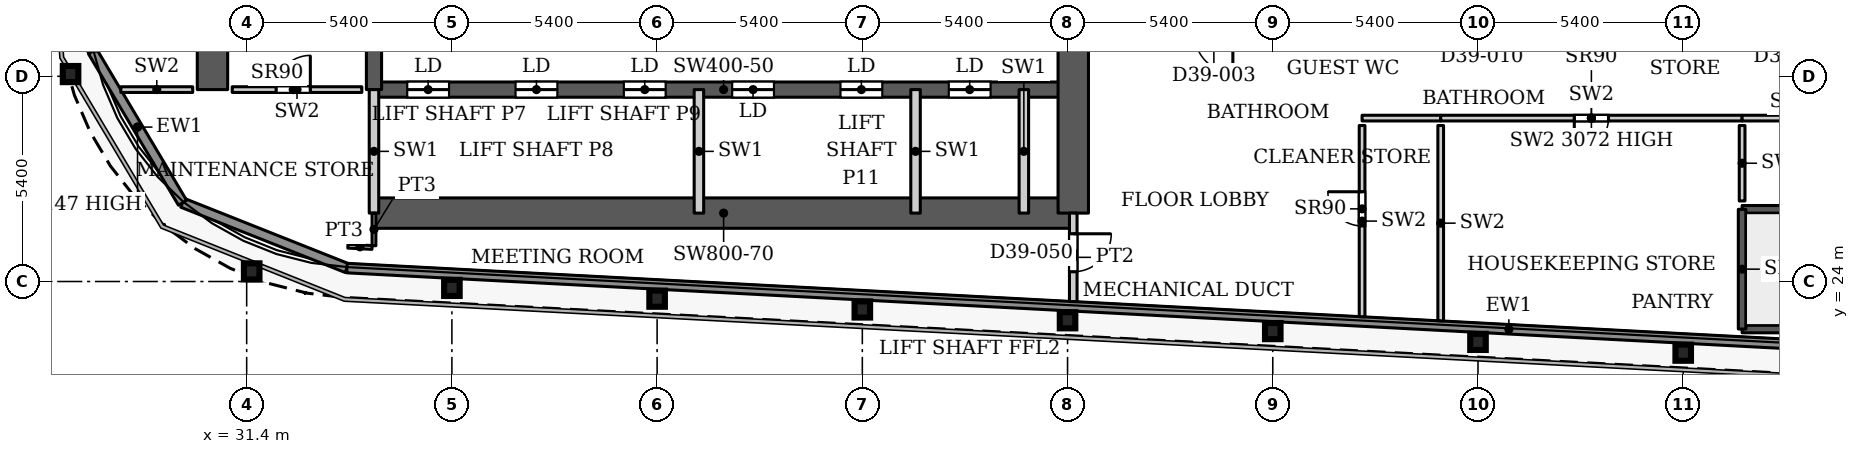
"""IFC4 building model, lengths in metres.
Left out: names, types, materials, properties, quantities, classifications, styles, units other than length and angle.
Written with IfcOpenShell. Run it as: python <this file> out.ifc"""

import sys

from ifc_helpers import new_model, si_unit, direction, frame, frame_2d, origin, origin_2d, place, context, subcontext, project, spatial, rectangle, i_section, extrude, source, transform, mapped, element, fill, save


model = new_model("IFC4")
c1 = context("Model", 3, precision=1e-05, world=origin(), true_north=direction((0.0, 1.0)))
c2 = subcontext(c1, "Body", "Model", "MODEL_VIEW")
j1 = project(units=[si_unit("LENGTHUNIT", "METRE"), si_unit("PLANEANGLEUNIT", "RADIAN")], contexts=[c1])
p1 = place(None, origin())
s1 = spatial("IfcSite", under=j1, at=p1, CompositionType="ELEMENT")
p2 = place(p1, origin())
s2 = spatial("IfcBuilding", under=s1, at=p2, CompositionType="ELEMENT")
p3 = place(p2, frame((0.0, 0.0, 172.1)))
s3 = spatial("IfcBuildingStorey", under=s2, at=p3, CompositionType="ELEMENT", Elevation=172.1)
for number, where, z_axis, x_axis in (
    (1, (69.2, 22.127, 0.0), (0.0, 0.0, 1.0), (1.0, 0.0, 0.0)),
    (2, (63.8, 22.411, 0.0), (0.0, 0.0, 1.0), (1.0, 0.0, 0.0)),
    (3, (58.4, 22.695, 0.0), (0.0, 0.0, 1.0), (1.0, 0.0, 0.0)),
    (4, (53.0, 22.98, 0.0), (0.0, 0.0, 1.0), (1.0, 0.0, 0.0)),
    (5, (47.6, 23.264, 0.0), (0.0, 0.0, 1.0), (1.0, 0.0, 0.0)),
    (6, (42.2, 23.548, 0.0), (0.0, 0.0, 1.0), (1.0, 0.0, 0.0)),
    (7, (36.8, 23.832, 0.0), (0.0, 0.0, 1.0), (1.0, 0.0, 0.0)),
    (8, (31.532, 24.266, 0.0), (0.0, 0.0, 1.0), (1.0, 0.0, 0.0)),
    (9, (26.766, 29.459, 0.0), (0.0, 0.0, 1.0), (1.0, 0.0, 0.0)),
):
    element("IfcColumn", number, at=place(p3, frame(where, z_axis=z_axis, x_axis=x_axis)), inside=s3, PredefinedType="COLUMN", context=c2, shape_type="SweptSolid", body=[
        extrude(i_section(OverallWidth=0.409, OverallDepth=0.425, WebThickness=0.033, FlangeThickness=0.052, FilletRadius=0.013, at=origin_2d()), origin(), (0.0, 0.0, 1.0), 3.9),
    ])
p4 = place(p3, frame((34.75, 25.8, 0.0), z_axis=(0.0, 0.0, 1.0), x_axis=(1.0, 0.0, 0.0)))
e10 = element("IfcWall", 10, at=p4, inside=s3, PredefinedType="SHEAR", context=c2, shape_type="SweptSolid", body=[
    extrude(rectangle(XDim=18.4, YDim=0.8, at=frame_2d((9.2, 0.0))), origin(), (0.0, 0.0, 1.0), 3.9),
])
p5 = place(p3, frame((34.75, 29.05, 0.0), z_axis=(0.0, 0.0, 1.0), x_axis=(1.0, 0.0, 0.0)))
e11 = element("IfcWall", 11, at=p5, inside=s3, PredefinedType="SHEAR", context=c2, shape_type="SweptSolid", body=[
    extrude(rectangle(XDim=18.4, YDim=0.4, at=frame_2d((9.2, 0.0))), origin(), (0.0, 0.0, 1.0), 3.9),
])
p6 = place(p5, frame((0.875, 0.0, 0.0)))
e12 = element("IfcOpeningElement", 12, at=p6, cuts=e11, PredefinedType="OPENING", context=c2, shape_type="SweptSolid", body=[
    extrude(rectangle(XDim=1.1, YDim=2.2, at=frame_2d((0.55, 1.1))), frame((0.0, 0.21, 0.0), z_axis=(0.0, -1.0, 0.0), x_axis=(1.0, 0.0, 0.0)), (0.0, 0.0, 1.0), 0.42),
])
p7 = place(p5, frame((3.725, 0.0, 0.0)))
e13 = element("IfcOpeningElement", 13, at=p7, cuts=e11, PredefinedType="OPENING", context=c2, shape_type="SweptSolid", body=[
    extrude(rectangle(XDim=1.1, YDim=2.2, at=frame_2d((0.55, 1.1))), frame((0.0, 0.21, 0.0), z_axis=(0.0, -1.0, 0.0), x_axis=(1.0, 0.0, 0.0)), (0.0, 0.0, 1.0), 0.42),
])
p8 = place(p5, frame((6.575, 0.0, 0.0)))
e14 = element("IfcOpeningElement", 14, at=p8, cuts=e11, PredefinedType="OPENING", context=c2, shape_type="SweptSolid", body=[
    extrude(rectangle(XDim=1.1, YDim=2.2, at=frame_2d((0.55, 1.1))), frame((0.0, 0.21, 0.0), z_axis=(0.0, -1.0, 0.0), x_axis=(1.0, 0.0, 0.0)), (0.0, 0.0, 1.0), 0.42),
])
p9 = place(p5, frame((9.425, 0.0, 0.0)))
e15 = element("IfcOpeningElement", 15, at=p9, cuts=e11, PredefinedType="OPENING", context=c2, shape_type="SweptSolid", body=[
    extrude(rectangle(XDim=1.1, YDim=2.2, at=frame_2d((0.55, 1.1))), frame((0.0, 0.21, 0.0), z_axis=(0.0, -1.0, 0.0), x_axis=(1.0, 0.0, 0.0)), (0.0, 0.0, 1.0), 0.42),
])
p10 = place(p5, frame((12.275, 0.0, 0.0)))
e16 = element("IfcOpeningElement", 16, at=p10, cuts=e11, PredefinedType="OPENING", context=c2, shape_type="SweptSolid", body=[
    extrude(rectangle(XDim=1.1, YDim=2.2, at=frame_2d((0.55, 1.1))), frame((0.0, 0.21, 0.0), z_axis=(0.0, -1.0, 0.0), x_axis=(1.0, 0.0, 0.0)), (0.0, 0.0, 1.0), 0.42),
])
p11 = place(p5, frame((15.125, 0.0, 0.0)))
e17 = element("IfcOpeningElement", 17, at=p11, cuts=e11, PredefinedType="OPENING", context=c2, shape_type="SweptSolid", body=[
    extrude(rectangle(XDim=1.1, YDim=2.2, at=frame_2d((0.55, 1.1))), frame((0.0, 0.21, 0.0), z_axis=(0.0, -1.0, 0.0), x_axis=(1.0, 0.0, 0.0)), (0.0, 0.0, 1.0), 0.42),
])
p12 = place(p3, frame((34.75, 29.05, 0.0), z_axis=(0.0, 0.0, 1.0), x_axis=(0.0, 1.0, 0.0)))
e18 = element("IfcWall", 18, at=p12, inside=s3, PredefinedType="SHEAR", context=c2, shape_type="SweptSolid", body=[
    extrude(rectangle(XDim=18.45, YDim=0.4, at=frame_2d((9.225, 0.0))), origin(), (0.0, 0.0, 1.0), 3.9),
])
p13 = place(p12, frame((8.025, 0.0, 0.0)))
e19 = element("IfcOpeningElement", 19, at=p13, cuts=e18, PredefinedType="OPENING", context=c2, shape_type="SweptSolid", body=[
    extrude(rectangle(XDim=1.1, YDim=2.2, at=frame_2d((0.55, 1.1))), frame((0.0, 0.21, 0.0), z_axis=(0.0, -1.0, 0.0), x_axis=(1.0, 0.0, 0.0)), (0.0, 0.0, 1.0), 0.42),
])
p14 = place(p12, frame((10.875, 0.0, 0.0)))
e20 = element("IfcOpeningElement", 20, at=p14, cuts=e18, PredefinedType="OPENING", context=c2, shape_type="SweptSolid", body=[
    extrude(rectangle(XDim=1.1, YDim=2.2, at=frame_2d((0.55, 1.1))), frame((0.0, 0.21, 0.0), z_axis=(0.0, -1.0, 0.0), x_axis=(1.0, 0.0, 0.0)), (0.0, 0.0, 1.0), 0.42),
])
p15 = place(p12, frame((13.725, 0.0, 0.0)))
e21 = element("IfcOpeningElement", 21, at=p15, cuts=e18, PredefinedType="OPENING", context=c2, shape_type="SweptSolid", body=[
    extrude(rectangle(XDim=1.1, YDim=2.2, at=frame_2d((0.55, 1.1))), frame((0.0, 0.21, 0.0), z_axis=(0.0, -1.0, 0.0), x_axis=(1.0, 0.0, 0.0)), (0.0, 0.0, 1.0), 0.42),
])
p16 = place(p12, frame((15.95, 0.0, 0.0)))
e22 = element("IfcOpeningElement", 22, at=p16, cuts=e18, PredefinedType="OPENING", context=c2, shape_type="SweptSolid", body=[
    extrude(rectangle(XDim=1.1, YDim=2.2, at=frame_2d((0.55, 1.1))), frame((0.0, 0.21, 0.0), z_axis=(0.0, -1.0, 0.0), x_axis=(1.0, 0.0, 0.0)), (0.0, 0.0, 1.0), 0.42),
])
p17 = place(p3, frame((30.5, 29.05, 0.0), z_axis=(0.0, 0.0, 1.0), x_axis=(0.0, 1.0, 0.0)))
e23 = element("IfcWall", 23, at=p17, inside=s3, PredefinedType="SHEAR", context=c2, shape_type="SweptSolid", body=[
    extrude(rectangle(XDim=18.45, YDim=0.8, at=frame_2d((9.225, 0.0))), origin(), (0.0, 0.0, 1.0), 3.9),
])
p18 = place(p17, frame((1.5, 0.0, 0.0)))
e24 = element("IfcOpeningElement", 24, at=p18, cuts=e23, PredefinedType="OPENING", context=c2, shape_type="SweptSolid", body=[
    extrude(rectangle(XDim=0.9, YDim=2.2, at=frame_2d((0.45, 1.1))), frame((0.0, 0.41, 0.0), z_axis=(0.0, -1.0, 0.0), x_axis=(1.0, 0.0, 0.0)), (0.0, 0.0, 1.0), 0.82),
])
p19 = place(p17, frame((7.406, 0.0, 0.0)))
e25 = element("IfcOpeningElement", 25, at=p19, cuts=e23, PredefinedType="OPENING", context=c2, shape_type="SweptSolid", body=[
    extrude(rectangle(XDim=0.9, YDim=2.2, at=frame_2d((0.45, 1.1))), frame((0.0, 0.41, 0.0), z_axis=(0.0, -1.0, 0.0), x_axis=(1.0, 0.0, 0.0)), (0.0, 0.0, 1.0), 0.82),
])
p20 = place(p17, frame((11.688, 0.0, 0.0)))
e26 = element("IfcOpeningElement", 26, at=p20, cuts=e23, PredefinedType="OPENING", context=c2, shape_type="SweptSolid", body=[
    extrude(rectangle(XDim=0.9, YDim=2.2, at=frame_2d((0.45, 1.1))), frame((0.0, 0.41, 0.0), z_axis=(0.0, -1.0, 0.0), x_axis=(1.0, 0.0, 0.0)), (0.0, 0.0, 1.0), 0.82),
])
p21 = place(p3, frame((53.15, 25.8, 0.0), z_axis=(0.0, 0.0, 1.0), x_axis=(0.0, 1.0, 0.0)))
e27 = element("IfcWall", 27, at=p21, inside=s3, PredefinedType="SHEAR", context=c2, shape_type="SweptSolid", body=[
    extrude(rectangle(XDim=10.4, YDim=0.8, at=frame_2d((5.2, 0.0))), origin(), (0.0, 0.0, 1.0), 3.9),
])
p22 = place(p3, frame((34.039, 24.353, 0.0), z_axis=(0.0, 0.0, 1.0), x_axis=(-0.929352825399, 0.369192803184, 0.0)))
e28 = element("IfcWall", 28, at=p22, inside=s3, PredefinedType="SOLIDWALL", context=c2, shape_type="SweptSolid", body=[
    extrude(rectangle(XDim=4.656, YDim=0.25, at=frame_2d((2.328, 0.0))), origin(), (0.0, 0.0, 1.0), 3.75),
])
p23 = place(p3, frame((29.712, 26.072, 0.0), z_axis=(0.0, 0.0, 1.0), x_axis=(-0.511028049012, 0.859564036662, 0.0)))
e29 = element("IfcWall", 29, at=p23, inside=s3, PredefinedType="SOLIDWALL", context=c2, shape_type="SweptSolid", body=[
    extrude(rectangle(XDim=4.634, YDim=0.25, at=frame_2d((2.317, 0.0))), origin(), (0.0, 0.0, 1.0), 3.147),
])
p24 = place(p3, frame((27.344, 30.055, 0.0), z_axis=(0.0, 0.0, 1.0), x_axis=(-0.077571675317, 0.99698677784, 0.0)))
e30 = element("IfcWall", 30, at=p24, inside=s3, PredefinedType="SOLIDWALL", context=c2, shape_type="SweptSolid", body=[
    extrude(rectangle(XDim=1.92, YDim=0.25, at=frame_2d((0.96, 0.0))), origin(), (0.0, 0.0, 1.0), 3.75),
])
p25 = place(p3, frame((95.186, 21.134, 0.0), z_axis=(0.0, 0.0, 1.0), x_axis=(-0.998617201448, 0.052570761569, 0.0)))
e31 = element("IfcWall", 31, at=p25, inside=s3, PredefinedType="SOLIDWALL", context=c2, shape_type="SweptSolid", body=[
    extrude(rectangle(XDim=61.232, YDim=0.25, at=frame_2d((30.616, 0.0))), origin(), (0.0, 0.0, 1.0), 3.75),
])
p26 = place(p3, frame((70.75, 22.75, 0.0), z_axis=(0.0, 0.0, 1.0), x_axis=(1.0, 0.0, 0.0)))
e32 = element("IfcWall", 32, at=p26, inside=s3, PredefinedType="SHEAR", context=c2, shape_type="SweptSolid", body=[
    extrude(rectangle(XDim=9.16, YDim=0.2, at=frame_2d((4.58, 0.0))), origin(), (0.0, 0.0, 1.0), 3.9),
])
p27 = place(p3, frame((70.75, 25.9, 0.0), z_axis=(0.0, 0.0, 1.0), x_axis=(1.0, 0.0, 0.0)))
e33 = element("IfcWall", 33, at=p27, inside=s3, PredefinedType="SHEAR", context=c2, shape_type="SweptSolid", body=[
    extrude(rectangle(XDim=9.16, YDim=0.2, at=frame_2d((4.58, 0.0))), origin(), (0.0, 0.0, 1.0), 3.9),
])
p28 = place(p27, frame((7.81, 0.0, 0.0)))
e34 = element("IfcOpeningElement", 34, at=p28, cuts=e33, PredefinedType="OPENING", context=c2, shape_type="SweptSolid", body=[
    extrude(rectangle(XDim=1.1, YDim=2.2, at=frame_2d((0.55, 1.1))), frame((0.0, 0.11, 0.0), z_axis=(0.0, -1.0, 0.0), x_axis=(1.0, 0.0, 0.0)), (0.0, 0.0, 1.0), 0.22),
])
p29 = place(p3, frame((70.75, 22.75, 0.0), z_axis=(0.0, 0.0, 1.0), x_axis=(0.0, 1.0, 0.0)))
e35 = element("IfcWall", 35, at=p29, inside=s3, PredefinedType="SHEAR", context=c2, shape_type="SweptSolid", body=[
    extrude(rectangle(XDim=3.15, YDim=0.2, at=frame_2d((1.575, 0.0))), origin(), (0.0, 0.0, 1.0), 3.9),
])
for number, where, z_axis, x_axis in (
    (36, (34.75, 25.8, 0.0), (0.0, 0.0, 1.0), (0.0, 1.0, 0.0)),
    (37, (43.3, 25.8, 0.0), (0.0, 0.0, 1.0), (0.0, 1.0, 0.0)),
    (38, (49.0, 25.8, 0.0), (0.0, 0.0, 1.0), (0.0, 1.0, 0.0)),
    (39, (51.85, 25.8, 0.0), (0.0, 0.0, 1.0), (0.0, 1.0, 0.0)),
):
    element("IfcWall", number, at=place(p3, frame(where, z_axis=z_axis, x_axis=x_axis)), inside=s3, PredefinedType="PARTITIONING", context=c2, shape_type="SweptSolid", body=[
        extrude(rectangle(XDim=3.25, YDim=0.25, at=frame_2d((1.625, 0.0))), origin(), (0.0, 0.0, 1.0), 3.9),
    ])
p30 = place(p3, frame((28.089, 29.05, 0.0), z_axis=(0.0, 0.0, 1.0), x_axis=(1.0, 0.0, 0.0)))
e40 = element("IfcWall", 40, at=p30, inside=s3, PredefinedType="PARTITIONING", context=c2, shape_type="SweptSolid", body=[
    extrude(rectangle(XDim=1.891, YDim=0.15, at=frame_2d((0.945, 0.0))), origin(), (0.0, 0.0, 1.0), 3.9),
])
p31 = place(p3, frame((31.02, 29.05, 0.0), z_axis=(0.0, 0.0, 1.0), x_axis=(1.0, 0.0, 0.0)))
e41 = element("IfcWall", 41, at=p31, inside=s3, PredefinedType="PARTITIONING", context=c2, shape_type="SweptSolid", body=[
    extrude(rectangle(XDim=3.41, YDim=0.15, at=frame_2d((1.705, 0.0))), origin(), (0.0, 0.0, 1.0), 3.9),
])
p32 = place(p31, frame((1.155, 0.0, 0.0)))
e42 = element("IfcOpeningElement", 42, at=p32, cuts=e41, PredefinedType="OPENING", context=c2, shape_type="SweptSolid", body=[
    extrude(rectangle(XDim=0.9, YDim=2.2, at=frame_2d((0.45, 1.1))), frame((0.0, 0.085, 0.0), z_axis=(0.0, -1.0, 0.0), x_axis=(1.0, 0.0, 0.0)), (0.0, 0.0, 1.0), 0.17),
])
p33 = place(p3, frame((60.75, 28.3, 0.0), z_axis=(0.0, 0.0, 1.0), x_axis=(1.0, 0.0, 0.0)))
e43 = element("IfcWall", 43, at=p33, inside=s3, PredefinedType="PARTITIONING", context=c2, shape_type="SweptSolid", body=[
    extrude(rectangle(XDim=2.069, YDim=0.15, at=frame_2d((1.035, 0.0))), origin(), (0.0, 0.0, 1.0), 3.9),
])
p34 = place(p3, frame((60.75, 23.075, 0.0), z_axis=(0.0, 0.0, 1.0), x_axis=(0.0, 1.0, 0.0)))
e44 = element("IfcWall", 44, at=p34, inside=s3, PredefinedType="PARTITIONING", context=c2, shape_type="SweptSolid", body=[
    extrude(rectangle(XDim=5.03, YDim=0.15, at=frame_2d((2.515, 0.0))), origin(), (0.0, 0.0, 1.0), 3.9),
])
p35 = place(p34, frame((2.387, 0.0, 0.0)))
e45 = element("IfcOpeningElement", 45, at=p35, cuts=e44, PredefinedType="OPENING", context=c2, shape_type="SweptSolid", body=[
    extrude(rectangle(XDim=0.9, YDim=2.2, at=frame_2d((0.45, 1.1))), frame((0.0, 0.085, 0.0), z_axis=(0.0, -1.0, 0.0), x_axis=(1.0, 0.0, 0.0)), (0.0, 0.0, 1.0), 0.17),
])
p36 = place(p3, frame((62.819, 22.966, 0.0), z_axis=(0.0, 0.0, 1.0), x_axis=(0.0, 1.0, 0.0)))
e46 = element("IfcWall", 46, at=p36, inside=s3, PredefinedType="PARTITIONING", context=c2, shape_type="SweptSolid", body=[
    extrude(rectangle(XDim=5.139, YDim=0.15, at=frame_2d((2.569, 0.0))), origin(), (0.0, 0.0, 1.0), 3.9),
])
p37 = place(p3, frame((62.819, 28.3, 0.0), z_axis=(0.0, 0.0, 1.0), x_axis=(1.0, 0.0, 0.0)))
e47 = element("IfcWall", 47, at=p37, inside=s3, PredefinedType="PARTITIONING", context=c2, shape_type="SweptSolid", body=[
    extrude(rectangle(XDim=7.931, YDim=0.15, at=frame_2d((3.965, 0.0))), origin(), (0.0, 0.0, 1.0), 3.072),
])
p38 = place(p37, frame((3.515, 0.0, 0.0)))
e48 = element("IfcOpeningElement", 48, at=p38, cuts=e47, PredefinedType="OPENING", context=c2, shape_type="SweptSolid", body=[
    extrude(rectangle(XDim=0.9, YDim=2.2, at=frame_2d((0.45, 1.1))), frame((0.0, 0.085, 0.0), z_axis=(0.0, -1.0, 0.0), x_axis=(1.0, 0.0, 0.0)), (0.0, 0.0, 1.0), 0.17),
])
p39 = place(p3, frame((70.75, 26.12, 0.0), z_axis=(0.0, 0.0, 1.0), x_axis=(0.0, 1.0, 0.0)))
e49 = element("IfcWall", 49, at=p39, inside=s3, PredefinedType="PARTITIONING", context=c2, shape_type="SweptSolid", body=[
    extrude(rectangle(XDim=1.985, YDim=0.15, at=frame_2d((0.992, 0.0))), origin(), (0.0, 0.0, 1.0), 3.9),
])
p40 = place(p3, frame((70.75, 28.3, 0.0), z_axis=(0.0, 0.0, 1.0), x_axis=(1.0, 0.0, 0.0)))
e50 = element("IfcWall", 50, at=p40, inside=s3, PredefinedType="PARTITIONING", context=c2, shape_type="SweptSolid", body=[
    extrude(rectangle(XDim=3.686, YDim=0.15, at=frame_2d((1.843, 0.0))), origin(), (0.0, 0.0, 1.0), 3.9),
])
p41 = place(p40, frame((1.393, 0.0, 0.0)))
e51 = element("IfcOpeningElement", 51, at=p41, cuts=e50, PredefinedType="OPENING", context=c2, shape_type="SweptSolid", body=[
    extrude(rectangle(XDim=0.9, YDim=2.2, at=frame_2d((0.45, 1.1))), frame((0.0, 0.085, 0.0), z_axis=(0.0, -1.0, 0.0), x_axis=(1.0, 0.0, 0.0)), (0.0, 0.0, 1.0), 0.17),
])
p42 = place(p3, frame((34.063, 24.929, 0.0), z_axis=(0.0, 0.0, 1.0), x_axis=(0.998663963404, -0.051674831376, 0.0)))
e52 = element("IfcWall", 52, at=p42, inside=s3, PredefinedType="PARTITIONING", context=c2, shape_type="SweptSolid", body=[
    extrude(rectangle(XDim=0.638, YDim=0.1, at=frame_2d((0.319, 0.0))), origin(), (0.0, 0.0, 1.0), 3.6),
])
p43 = place(p3, frame((34.75, 24.942, 0.0), z_axis=(0.0, 0.0, 1.0), x_axis=(0.0, 1.0, 0.0)))
e53 = element("IfcWall", 53, at=p43, inside=s3, PredefinedType="PARTITIONING", context=c2, shape_type="SweptSolid", body=[
    extrude(rectangle(XDim=0.858, YDim=0.1, at=frame_2d((0.429, 0.0))), origin(), (0.0, 0.0, 1.0), 3.6),
])
p44 = place(p3, frame((53.15, 23.472, 0.0), z_axis=(0.0, 0.0, 1.0), x_axis=(0.0, 1.0, 0.0)))
e54 = element("IfcWall", 54, at=p44, inside=s3, PredefinedType="PARTITIONING", context=c2, shape_type="SweptSolid", body=[
    extrude(rectangle(XDim=2.328, YDim=0.2, at=frame_2d((1.164, 0.0))), origin(), (0.0, 0.0, 1.0), 3.6),
])
p45 = place(p44, frame((0.784, 0.0, 0.0)))
e55 = element("IfcOpeningElement", 55, at=p45, cuts=e54, PredefinedType="OPENING", context=c2, shape_type="SweptSolid", body=[
    extrude(rectangle(XDim=1.0, YDim=2.1, at=frame_2d((0.5, 1.05))), frame((0.0, 0.11, 0.0), z_axis=(0.0, -1.0, 0.0), x_axis=(1.0, 0.0, 0.0)), (0.0, 0.0, 1.0), 0.22),
])
m1 = source(origin(), c2, "Body", "SweptSolid", [
    extrude(rectangle(XDim=1.1, YDim=2.2, at=frame_2d((0.55, 1.1))), frame((0.0, 0.025, 0.0), z_axis=(0.0, -1.0, 0.0), x_axis=(1.0, 0.0, 0.0)), (0.0, 0.0, 1.0), 0.05),
])
p46 = place(p6, origin())
e56 = element("IfcDoor", 56, at=p46, inside=s3, OperationType="SLIDING_TO_LEFT", PredefinedType="DOOR", context=c2, shape_type="MappedRepresentation", body=[
    mapped(m1, transform((0.0, 0.0, 0.0), x_axis=(1.0, 0.0, 0.0), y_axis=(0.0, 1.0, 0.0), z_axis=(0.0, 0.0, 1.0), scale=1.0)),
])
fill(e12, e56)
p47 = place(p7, origin())
e57 = element("IfcDoor", 57, at=p47, inside=s3, OperationType="SLIDING_TO_LEFT", PredefinedType="DOOR", context=c2, shape_type="MappedRepresentation", body=[
    mapped(m1, transform((0.0, 0.0, 0.0), x_axis=(1.0, 0.0, 0.0), y_axis=(0.0, 1.0, 0.0), z_axis=(0.0, 0.0, 1.0), scale=1.0)),
])
fill(e13, e57)
p48 = place(p8, origin())
e58 = element("IfcDoor", 58, at=p48, inside=s3, OperationType="SLIDING_TO_LEFT", PredefinedType="DOOR", context=c2, shape_type="MappedRepresentation", body=[
    mapped(m1, transform((0.0, 0.0, 0.0), x_axis=(1.0, 0.0, 0.0), y_axis=(0.0, 1.0, 0.0), z_axis=(0.0, 0.0, 1.0), scale=1.0)),
])
fill(e14, e58)
p49 = place(p9, origin())
e59 = element("IfcDoor", 59, at=p49, inside=s3, OperationType="SLIDING_TO_LEFT", PredefinedType="DOOR", context=c2, shape_type="MappedRepresentation", body=[
    mapped(m1, transform((0.0, 0.0, 0.0), x_axis=(1.0, 0.0, 0.0), y_axis=(0.0, 1.0, 0.0), z_axis=(0.0, 0.0, 1.0), scale=1.0)),
])
fill(e15, e59)
p50 = place(p10, origin())
e60 = element("IfcDoor", 60, at=p50, inside=s3, OperationType="SLIDING_TO_LEFT", PredefinedType="DOOR", context=c2, shape_type="MappedRepresentation", body=[
    mapped(m1, transform((0.0, 0.0, 0.0), x_axis=(1.0, 0.0, 0.0), y_axis=(0.0, 1.0, 0.0), z_axis=(0.0, 0.0, 1.0), scale=1.0)),
])
fill(e16, e60)
p51 = place(p11, origin())
e61 = element("IfcDoor", 61, at=p51, inside=s3, OperationType="SLIDING_TO_LEFT", PredefinedType="DOOR", context=c2, shape_type="MappedRepresentation", body=[
    mapped(m1, transform((0.0, 0.0, 0.0), x_axis=(1.0, 0.0, 0.0), y_axis=(0.0, 1.0, 0.0), z_axis=(0.0, 0.0, 1.0), scale=1.0)),
])
fill(e17, e61)
m2 = source(origin(), c2, "Body", "SweptSolid", [
    extrude(rectangle(XDim=0.9, YDim=2.2, at=frame_2d((0.45, 1.1))), frame((0.0, 0.025, 0.0), z_axis=(0.0, -1.0, 0.0), x_axis=(1.0, 0.0, 0.0)), (0.0, 0.0, 1.0), 0.05),
])
p52 = place(p32, origin())
e62 = element("IfcDoor", 62, at=p52, inside=s3, OperationType="SINGLE_SWING_LEFT", PredefinedType="DOOR", context=c2, shape_type="MappedRepresentation", body=[
    mapped(m2, transform((0.0, 0.0, 0.0), x_axis=(1.0, 0.0, 0.0), y_axis=(0.0, 1.0, 0.0), z_axis=(0.0, 0.0, 1.0), scale=1.0)),
])
fill(e42, e62)
p53 = place(p35, origin())
e63 = element("IfcDoor", 63, at=p53, inside=s3, OperationType="SINGLE_SWING_LEFT", PredefinedType="DOOR", context=c2, shape_type="MappedRepresentation", body=[
    mapped(m2, transform((0.0, 0.0, 0.0), x_axis=(1.0, 0.0, 0.0), y_axis=(0.0, 1.0, 0.0), z_axis=(0.0, 0.0, 1.0), scale=1.0)),
])
fill(e45, e63)
p54 = place(p38, origin())
e64 = element("IfcDoor", 64, at=p54, inside=s3, OperationType="SINGLE_SWING_RIGHT", PredefinedType="DOOR", context=c2, shape_type="MappedRepresentation", body=[
    mapped(m2, transform((0.0, 0.0, 0.0), x_axis=(1.0, 0.0, 0.0), y_axis=(0.0, 1.0, 0.0), z_axis=(0.0, 0.0, 1.0), scale=1.0)),
])
fill(e48, e64)
m3 = source(origin(), c2, "Body", "SweptSolid", [
    extrude(rectangle(XDim=1.0, YDim=2.1, at=frame_2d((0.5, 1.05))), frame((0.0, 0.025, 0.0), z_axis=(0.0, -1.0, 0.0), x_axis=(1.0, 0.0, 0.0)), (0.0, 0.0, 1.0), 0.05),
])
p55 = place(p45, origin())
e65 = element("IfcDoor", 65, at=p55, inside=s3, OperationType="SINGLE_SWING_RIGHT", PredefinedType="DOOR", context=c2, shape_type="MappedRepresentation", body=[
    mapped(m3, transform((0.0, 0.0, 0.0), x_axis=(1.0, 0.0, 0.0), y_axis=(0.0, 1.0, 0.0), z_axis=(0.0, 0.0, 1.0), scale=1.0)),
])
fill(e55, e65)
save(model, sys.argv[1])
